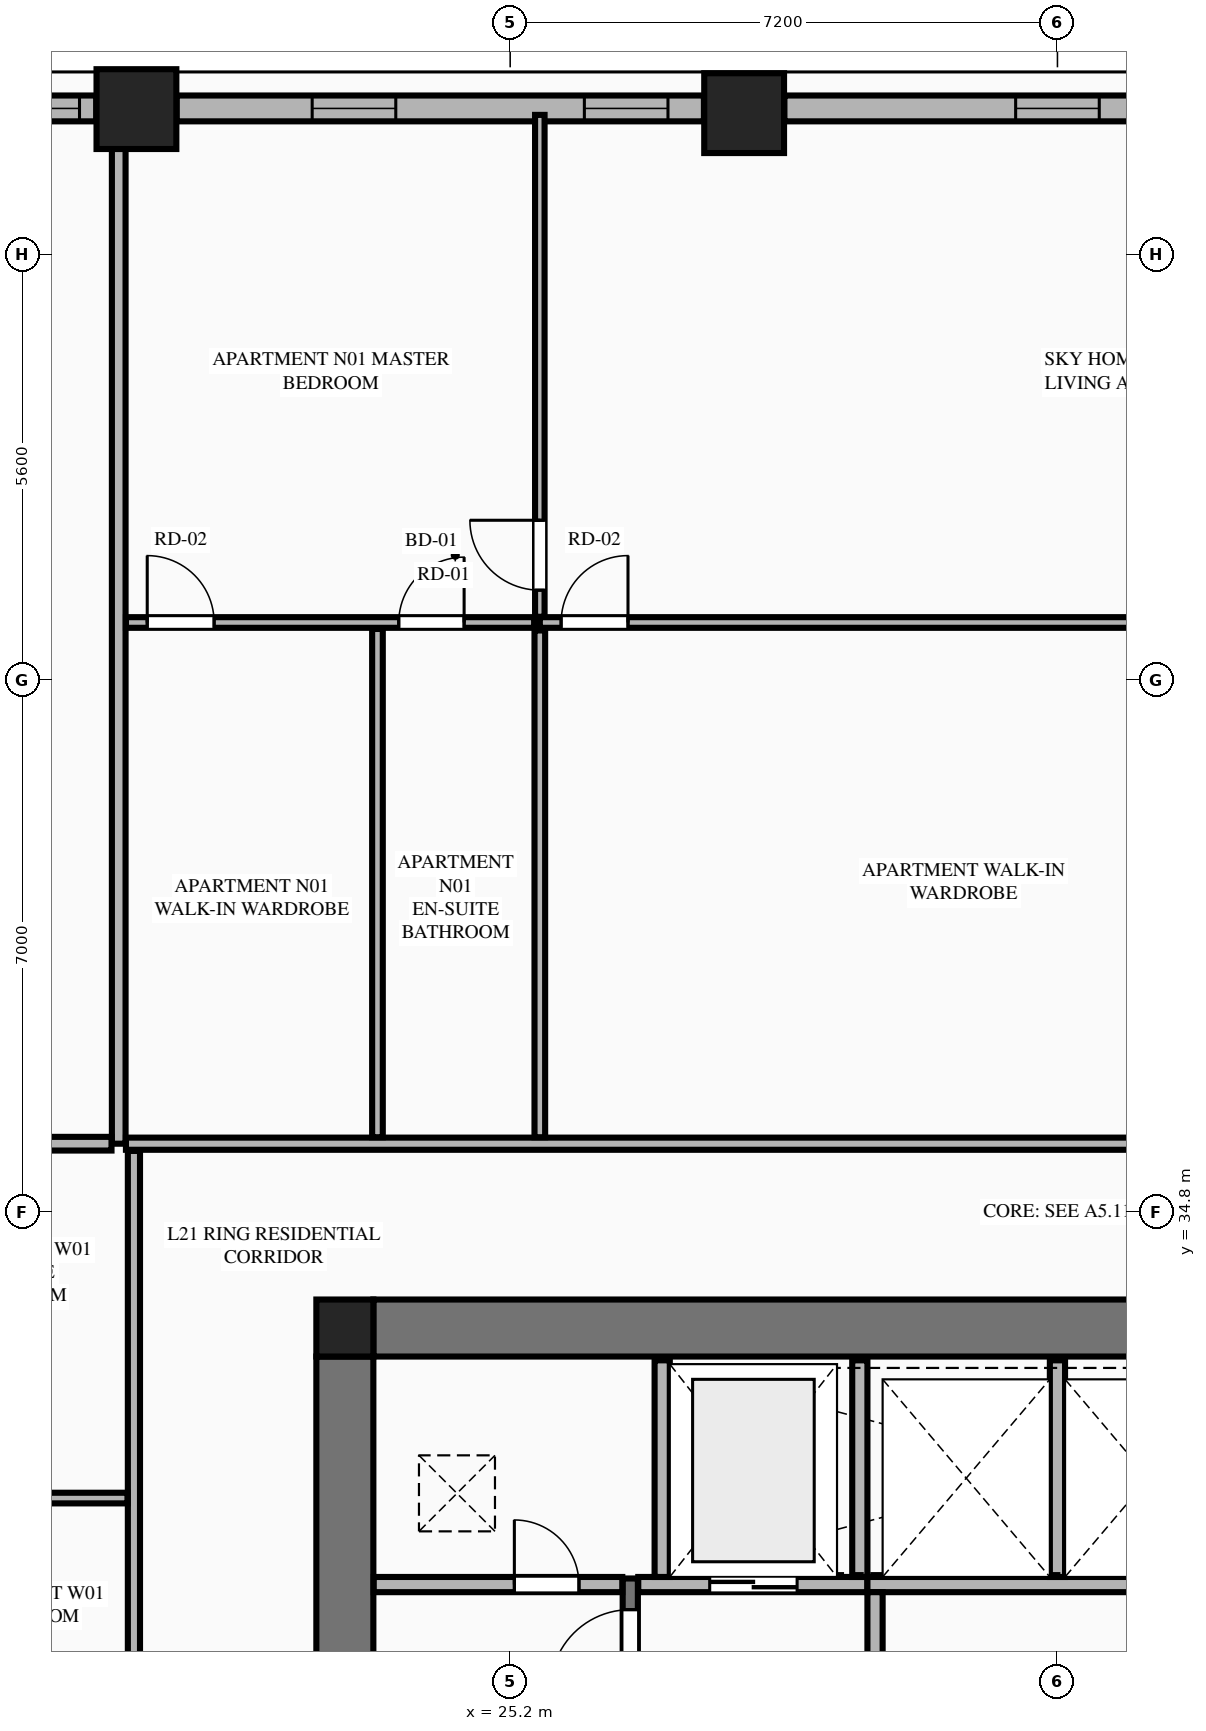
"""IFC4 building model, lengths in metres.
Left out: names, types, materials, properties, quantities, classifications, styles, units other than length and angle.
Written with IfcOpenShell. Run it as: python <this file> out.ifc"""

import sys

from ifc_helpers import new_model, si_unit, direction, frame, frame_2d, origin, origin_2d, place, context, subcontext, project, spatial, rectangle, extrude, element, fill, save


model = new_model("IFC4")
c1 = context("Model", 3, precision=1e-05, world=origin(), true_north=direction((0.0, 1.0)))
c2 = subcontext(c1, "Body", "Model", "MODEL_VIEW")
j1 = project(units=[si_unit("LENGTHUNIT", "METRE"), si_unit("PLANEANGLEUNIT", "RADIAN")], contexts=[c1])
p1 = place(None, origin())
s1 = spatial("IfcSite", under=j1, at=p1, CompositionType="ELEMENT")
p2 = place(p1, origin())
s2 = spatial("IfcBuilding", under=s1, at=p2, CompositionType="ELEMENT")
p3 = place(p2, frame((0.0, 0.0, 83.55)))
s3 = spatial("IfcBuildingStorey", under=s2, at=p3, CompositionType="ELEMENT", Elevation=83.55)
p4 = place(p3, frame((23.025, 33.275, 0.0), z_axis=(0.0, 0.0, 1.0), x_axis=(1.0, 0.0, 0.0)))
e1 = element("IfcColumn", 1, at=p4, inside=s3, PredefinedType="COLUMN", context=c2, shape_type="SweptSolid", body=[
    extrude(rectangle(XDim=0.75, YDim=0.75, at=origin_2d()), origin(), (0.0, 0.0, 1.0), 3.55),
])
p5 = place(p3, frame((23.4, 33.275, 0.0), z_axis=(0.0, 0.0, 1.0), x_axis=(1.0, 0.0, 0.0)))
e2 = element("IfcWall", 2, at=p5, inside=s3, PredefinedType="SHEAR", context=c2, shape_type="SweptSolid", body=[
    extrude(rectangle(XDim=18.0, YDim=0.75, at=frame_2d((9.0, 0.0))), origin(), (0.0, 0.0, 1.0), 3.33),
])
p6 = place(p3, frame((23.025, 18.9, 0.0), z_axis=(0.0, 0.0, 1.0), x_axis=(0.0, 1.0, 0.0)))
e3 = element("IfcWall", 3, at=p6, inside=s3, PredefinedType="SHEAR", context=c2, shape_type="SweptSolid", body=[
    extrude(rectangle(XDim=14.0, YDim=0.75, at=frame_2d((7.0, 0.0))), origin(), (0.0, 0.0, 1.0), 3.33),
])
p7 = place(p6, frame((2.94, 0.0, 0.0)))
e4 = element("IfcOpeningElement", 4, at=p7, cuts=e3, PredefinedType="OPENING", context=c2, shape_type="SweptSolid", body=[
    extrude(rectangle(XDim=1.22, YDim=2.25, at=frame_2d((0.61, 1.125))), frame((0.0, 0.385, 0.0), z_axis=(0.0, -1.0, 0.0), x_axis=(1.0, 0.0, 0.0)), (0.0, 0.0, 1.0), 0.77),
])
for number, where, z_axis, x_axis in (
    (5, (28.278, 49.258, 0.0), (0.0, 0.0, 1.0), (1.0, 0.0, 0.0)),
    (6, (20.283, 49.311, 0.0), (0.0, 0.0, 1.0), (1.0, 0.0, 0.0)),
):
    element("IfcColumn", number, at=place(p3, frame(where, z_axis=z_axis, x_axis=x_axis)), inside=s3, PredefinedType="COLUMN", context=c2, shape_type="SweptSolid", body=[
        extrude(rectangle(XDim=1.05, YDim=1.05, at=origin_2d()), origin(), (0.0, 0.0, 1.0), 3.55),
    ])
p8 = place(p3, frame((26.78, 23.2, 0.0), z_axis=(0.0, 0.0, 1.0), x_axis=(0.0, 1.0, 0.0)))
e7 = element("IfcWall", 7, at=p8, inside=s3, PredefinedType="SHEAR", context=c2, shape_type="SweptSolid", body=[
    extrude(rectangle(XDim=6.78, YDim=0.2, at=frame_2d((3.39, 0.0))), origin(), (0.0, 0.0, 1.0), 3.55),
])
p9 = place(p8, frame((5.32, 0.0, 0.0)))
e8 = element("IfcOpeningElement", 8, at=p9, cuts=e7, PredefinedType="OPENING", context=c2, shape_type="SweptSolid", body=[
    extrude(rectangle(XDim=1.05, YDim=2.15, at=frame_2d((0.525, 1.075))), frame((0.0, 0.11, 0.0), z_axis=(0.0, -1.0, 0.0), x_axis=(1.0, 0.0, 0.0)), (0.0, 0.0, 1.0), 0.22),
])
p10 = place(p3, frame((23.405, 29.9, 0.0), z_axis=(0.0, 0.0, 1.0), x_axis=(1.0, 0.0, 0.0)))
e9 = element("IfcWall", 9, at=p10, inside=s3, PredefinedType="PLUMBINGWALL", context=c2, shape_type="SweptSolid", body=[
    extrude(rectangle(XDim=3.27, YDim=0.2, at=frame_2d((1.635, 0.0))), origin(), (0.0, 0.0, 1.0), 3.33),
])
p11 = place(p10, frame((1.85, 0.0, 0.0)))
e10 = element("IfcOpeningElement", 10, at=p11, cuts=e9, PredefinedType="OPENING", context=c2, shape_type="SweptSolid", body=[
    extrude(rectangle(XDim=0.85, YDim=2.05, at=frame_2d((0.425, 1.025))), frame((0.0, 0.11, 0.0), z_axis=(0.0, -1.0, 0.0), x_axis=(1.0, 0.0, 0.0)), (0.0, 0.0, 1.0), 0.22),
])
p12 = place(p3, frame((26.885, 29.9, 0.0), z_axis=(0.0, 0.0, 1.0), x_axis=(1.0, 0.0, 0.0)))
e11 = element("IfcWall", 11, at=p12, inside=s3, PredefinedType="PLUMBINGWALL", context=c2, shape_type="SweptSolid", body=[
    extrude(rectangle(XDim=3.015, YDim=0.2, at=frame_2d((1.507, 0.0))), origin(), (0.0, 0.0, 1.0), 3.33),
])
p13 = place(p12, frame((0.94, 0.0, 0.0)))
e12 = element("IfcOpeningElement", 12, at=p13, cuts=e11, PredefinedType="OPENING", context=c2, shape_type="SweptSolid", body=[
    extrude(rectangle(XDim=1.15, YDim=2.2, at=frame_2d((0.575, 1.1))), frame((0.0, 0.11, 0.0), z_axis=(0.0, -1.0, 0.0), x_axis=(1.0, 0.0, 0.0)), (0.0, 0.0, 1.0), 0.22),
])
p14 = place(p3, frame((29.9, 29.9, 0.0), z_axis=(0.0, 0.0, 1.0), x_axis=(1.0, 0.0, 0.0)))
e13 = element("IfcWall", 13, at=p14, inside=s3, PredefinedType="PLUMBINGWALL", context=c2, shape_type="SweptSolid", body=[
    extrude(rectangle(XDim=5.0, YDim=0.2, at=frame_2d((2.5, 0.0))), origin(), (0.0, 0.0, 1.0), 3.33),
])
for number, where, z_axis, x_axis in (
    (14, (27.2, 30.0, 0.0), (0.0, 0.0, 1.0), (0.0, 1.0, 0.0)),
    (15, (29.8, 30.0, 0.0), (0.0, 0.0, 1.0), (0.0, 1.0, 0.0)),
    (16, (32.4, 30.0, 0.0), (0.0, 0.0, 1.0), (0.0, 1.0, 0.0)),
):
    element("IfcWall", number, at=place(p3, frame(where, z_axis=z_axis, x_axis=x_axis)), inside=s3, PredefinedType="PLUMBINGWALL", context=c2, shape_type="SweptSolid", body=[
        extrude(rectangle(XDim=2.85, YDim=0.2, at=frame_2d((1.425, 0.0))), origin(), (0.0, 0.0, 1.0), 3.33),
    ])
p15 = place(p3, frame((30.0, 27.05, 0.0), z_axis=(0.0, 0.0, 1.0), x_axis=(0.0, 1.0, 0.0)))
e17 = element("IfcWall", 17, at=p15, inside=s3, PredefinedType="PLUMBINGWALL", context=c2, shape_type="SweptSolid", body=[
    extrude(rectangle(XDim=2.75, YDim=0.2, at=frame_2d((1.375, 0.0))), origin(), (0.0, 0.0, 1.0), 3.33),
])
p16 = place(p15, frame((0.85, 0.0, 0.0)))
e18 = element("IfcOpeningElement", 18, at=p16, cuts=e17, PredefinedType="OPENING", context=c2, shape_type="SweptSolid", body=[
    extrude(rectangle(XDim=1.0, YDim=2.15, at=frame_2d((0.5, 1.075))), frame((0.0, 0.11, 0.0), z_axis=(0.0, -1.0, 0.0), x_axis=(1.0, 0.0, 0.0)), (0.0, 0.0, 1.0), 0.22),
])
p17 = place(p3, frame((35.993, 49.32, 0.0), z_axis=(0.0, 0.0, 1.0), x_axis=(-1.0, 0.0, 0.0)))
e19 = element("IfcWall", 19, at=p17, inside=s3, PredefinedType="STANDARD", context=c2, shape_type="SweptSolid", body=[
    extrude(rectangle(XDim=7.186, YDim=0.34, at=frame_2d((3.593, 0.0))), origin(), (0.0, 0.0, 1.0), 2.787),
])
p18 = place(p17, frame((3.043, 0.0, 0.75)))
e20 = element("IfcOpeningElement", 20, at=p18, cuts=e19, PredefinedType="OPENING", context=c2, shape_type="SweptSolid", body=[
    extrude(rectangle(XDim=1.1, YDim=1.887, at=frame_2d((0.55, 0.943))), frame((0.0, 0.18, 0.0), z_axis=(0.0, -1.0, 0.0), x_axis=(1.0, 0.0, 0.0)), (0.0, 0.0, 1.0), 0.36),
])
p19 = place(p3, frame((27.749, 49.32, 0.0), z_axis=(0.0, 0.0, 1.0), x_axis=(-1.0, 0.0, 0.0)))
e21 = element("IfcWall", 21, at=p19, inside=s3, PredefinedType="STANDARD", context=c2, shape_type="SweptSolid", body=[
    extrude(rectangle(XDim=6.937, YDim=0.34, at=frame_2d((3.469, 0.0))), origin(), (0.0, 0.0, 1.0), 2.787),
])
p20 = place(p19, frame((0.473, 0.0, 0.75)))
e22 = element("IfcOpeningElement", 22, at=p20, cuts=e21, PredefinedType="OPENING", context=c2, shape_type="SweptSolid", body=[
    extrude(rectangle(XDim=1.1, YDim=1.887, at=frame_2d((0.55, 0.943))), frame((0.0, 0.18, 0.0), z_axis=(0.0, -1.0, 0.0), x_axis=(1.0, 0.0, 0.0)), (0.0, 0.0, 1.0), 0.36),
])
p21 = place(p19, frame((4.054, 0.0, 0.75)))
e23 = element("IfcOpeningElement", 23, at=p21, cuts=e21, PredefinedType="OPENING", context=c2, shape_type="SweptSolid", body=[
    extrude(rectangle(XDim=1.1, YDim=1.887, at=frame_2d((0.55, 0.943))), frame((0.0, 0.18, 0.0), z_axis=(0.0, -1.0, 0.0), x_axis=(1.0, 0.0, 0.0)), (0.0, 0.0, 1.0), 0.36),
])
p22 = place(p3, frame((19.754, 49.32, 0.0), z_axis=(0.0, 0.0, 1.0), x_axis=(-1.0, 0.0, 0.0)))
e24 = element("IfcWall", 24, at=p22, inside=s3, PredefinedType="STANDARD", context=c2, shape_type="SweptSolid", body=[
    extrude(rectangle(XDim=1.32, YDim=0.34, at=frame_2d((0.66, 0.0))), origin(), (0.0, 0.0, 1.0), 3.33),
])
p23 = place(p22, frame((0.22, 0.0, 0.75)))
e25 = element("IfcOpeningElement", 25, at=p23, cuts=e24, PredefinedType="OPENING", context=c2, shape_type="SweptSolid", body=[
    extrude(rectangle(XDim=0.88, YDim=2.0, at=frame_2d((0.44, 1.0))), frame((0.0, 0.18, 0.0), z_axis=(0.0, -1.0, 0.0), x_axis=(1.0, 0.0, 0.0)), (0.0, 0.0, 1.0), 0.36),
])
p24 = place(p3, frame((20.05, 35.7, 0.0), z_axis=(0.0, 0.0, 1.0), x_axis=(0.0, 1.0, 0.0)))
e26 = element("IfcWall", 26, at=p24, inside=s3, PredefinedType="PARTITIONING", context=c2, shape_type="SweptSolid", body=[
    extrude(rectangle(XDim=13.445, YDim=0.18, at=frame_2d((6.723, 0.0))), origin(), (0.0, 0.0, 1.0), 3.33),
])
p25 = place(p3, frame((20.145, 35.7, 0.0), z_axis=(0.0, 0.0, 1.0), x_axis=(1.0, 0.0, 0.0)))
e27 = element("IfcWall", 27, at=p25, inside=s3, PredefinedType="PARTITIONING", context=c2, shape_type="SweptSolid", body=[
    extrude(rectangle(XDim=24.51, YDim=0.16, at=frame_2d((12.255, 0.0))), origin(), (0.0, 0.0, 1.0), 3.33),
])
p26 = place(p25, frame((22.305, 0.0, 0.0)))
e28 = element("IfcOpeningElement", 28, at=p26, cuts=e27, PredefinedType="OPENING", context=c2, shape_type="SweptSolid", body=[
    extrude(rectangle(XDim=1.02, YDim=2.25, at=frame_2d((0.51, 1.125))), frame((0.0, 0.09, 0.0), z_axis=(0.0, -1.0, 0.0), x_axis=(1.0, 0.0, 0.0)), (0.0, 0.0, 1.0), 0.18),
])
p27 = place(p3, frame((25.59, 42.557, 0.0), z_axis=(0.0, 0.0, 1.0), x_axis=(1.0, 0.0, 0.0)))
e29 = element("IfcWall", 29, at=p27, inside=s3, PredefinedType="PLUMBINGWALL", context=c2, shape_type="SweptSolid", body=[
    extrude(rectangle(XDim=16.61, YDim=0.14, at=frame_2d((8.305, 0.0))), origin(), (0.0, 0.0, 1.0), 3.33),
])
p28 = place(p27, frame((0.28, 0.0, 0.0)))
e30 = element("IfcOpeningElement", 30, at=p28, cuts=e29, PredefinedType="OPENING", context=c2, shape_type="SweptSolid", body=[
    extrude(rectangle(XDim=0.88, YDim=2.15, at=frame_2d((0.44, 1.075))), frame((0.0, 0.08, 0.0), z_axis=(0.0, -1.0, 0.0), x_axis=(1.0, 0.0, 0.0)), (0.0, 0.0, 1.0), 0.16),
])
p29 = place(p27, frame((11.429, 0.0, 0.0)))
e31 = element("IfcOpeningElement", 31, at=p29, cuts=e29, PredefinedType="OPENING", context=c2, shape_type="SweptSolid", body=[
    extrude(rectangle(XDim=0.86, YDim=2.1, at=frame_2d((0.43, 1.05))), frame((0.0, 0.08, 0.0), z_axis=(0.0, -1.0, 0.0), x_axis=(1.0, 0.0, 0.0)), (0.0, 0.0, 1.0), 0.16),
])
p30 = place(p27, frame((13.41, 0.0, 0.0)))
e32 = element("IfcOpeningElement", 32, at=p30, cuts=e29, PredefinedType="OPENING", context=c2, shape_type="SweptSolid", body=[
    extrude(rectangle(XDim=0.88, YDim=2.15, at=frame_2d((0.44, 1.075))), frame((0.0, 0.08, 0.0), z_axis=(0.0, -1.0, 0.0), x_axis=(1.0, 0.0, 0.0)), (0.0, 0.0, 1.0), 0.16),
])
p31 = place(p3, frame((20.145, 42.557, 0.0), z_axis=(0.0, 0.0, 1.0), x_axis=(1.0, 0.0, 0.0)))
e33 = element("IfcWall", 33, at=p31, inside=s3, PredefinedType="PLUMBINGWALL", context=c2, shape_type="SweptSolid", body=[
    extrude(rectangle(XDim=5.37, YDim=0.14, at=frame_2d((2.685, 0.0))), origin(), (0.0, 0.0, 1.0), 3.33),
])
p32 = place(p31, frame((0.28, 0.0, 0.0)))
e34 = element("IfcOpeningElement", 34, at=p32, cuts=e33, PredefinedType="OPENING", context=c2, shape_type="SweptSolid", body=[
    extrude(rectangle(XDim=0.88, YDim=2.15, at=frame_2d((0.44, 1.075))), frame((0.0, 0.08, 0.0), z_axis=(0.0, -1.0, 0.0), x_axis=(1.0, 0.0, 0.0)), (0.0, 0.0, 1.0), 0.16),
])
p33 = place(p31, frame((3.589, 0.0, 0.0)))
e35 = element("IfcOpeningElement", 35, at=p33, cuts=e33, PredefinedType="OPENING", context=c2, shape_type="SweptSolid", body=[
    extrude(rectangle(XDim=0.86, YDim=2.1, at=frame_2d((0.43, 1.05))), frame((0.0, 0.08, 0.0), z_axis=(0.0, -1.0, 0.0), x_axis=(1.0, 0.0, 0.0)), (0.0, 0.0, 1.0), 0.16),
])
p34 = place(p3, frame((25.59, 35.785, 0.0), z_axis=(0.0, 0.0, 1.0), x_axis=(0.0, 1.0, 0.0)))
e36 = element("IfcWall", 36, at=p34, inside=s3, PredefinedType="PLUMBINGWALL", context=c2, shape_type="SweptSolid", body=[
    extrude(rectangle(XDim=6.667, YDim=0.14, at=frame_2d((3.333, 0.0))), origin(), (0.0, 0.0, 1.0), 3.33),
])
p35 = place(p3, frame((25.59, 42.632, 0.0), z_axis=(0.0, 0.0, 1.0), x_axis=(0.0, 1.0, 0.0)))
e37 = element("IfcWall", 37, at=p35, inside=s3, PredefinedType="PARTITIONING", context=c2, shape_type="SweptSolid", body=[
    extrude(rectangle(XDim=6.603, YDim=0.125, at=frame_2d((3.302, 0.0))), origin(), (0.0, 0.0, 1.0), 3.33),
])
p36 = place(p35, frame((0.35, 0.0, 0.0)))
e38 = element("IfcOpeningElement", 38, at=p36, cuts=e37, PredefinedType="OPENING", context=c2, shape_type="SweptSolid", body=[
    extrude(rectangle(XDim=0.92, YDim=2.15, at=frame_2d((0.46, 1.075))), frame((0.0, 0.073, 0.0), z_axis=(0.0, -1.0, 0.0), x_axis=(1.0, 0.0, 0.0)), (0.0, 0.0, 1.0), 0.145),
])
p37 = place(p3, frame((23.454, 35.785, 0.0), z_axis=(0.0, 0.0, 1.0), x_axis=(0.0, 1.0, 0.0)))
e39 = element("IfcWall", 39, at=p37, inside=s3, PredefinedType="PLUMBINGWALL", context=c2, shape_type="SweptSolid", body=[
    extrude(rectangle(XDim=6.687, YDim=0.14, at=frame_2d((3.344, 0.0))), origin(), (0.0, 0.0, 1.0), 3.33),
])
p38 = place(p3, frame((10.589, 35.7, 0.0), z_axis=(0.0, 0.0, 1.0), x_axis=(1.0, 0.0, 0.0)))
e40 = element("IfcWall", 40, at=p38, inside=s3, PredefinedType="PARTITIONING", context=c2, shape_type="SweptSolid", body=[
    extrude(rectangle(XDim=9.366, YDim=0.18, at=frame_2d((4.683, 0.0))), origin(), (0.0, 0.0, 1.0), 3.33),
])
p39 = place(p3, frame((20.25, 16.195, 0.0), z_axis=(0.0, 0.0, 1.0), x_axis=(0.0, 1.0, 0.0)))
e41 = element("IfcWall", 41, at=p39, inside=s3, PredefinedType="PARTITIONING", context=c2, shape_type="SweptSolid", body=[
    extrude(rectangle(XDim=19.41, YDim=0.16, at=frame_2d((9.705, 0.0))), origin(), (0.0, 0.0, 1.0), 2.636),
])
p40 = place(p39, frame((0.45, 0.0, 0.0)))
e42 = element("IfcOpeningElement", 42, at=p40, cuts=e41, PredefinedType="OPENING", context=c2, shape_type="SweptSolid", body=[
    extrude(rectangle(XDim=1.02, YDim=2.25, at=frame_2d((0.51, 1.125))), frame((0.0, 0.09, 0.0), z_axis=(0.0, -1.0, 0.0), x_axis=(1.0, 0.0, 0.0)), (0.0, 0.0, 1.0), 0.18),
])
p41 = place(p3, frame((17.185, 31.038, 0.0), z_axis=(0.0, 0.0, 1.0), x_axis=(1.0, 0.0, 0.0)))
e43 = element("IfcWall", 43, at=p41, inside=s3, PredefinedType="PLUMBINGWALL", context=c2, shape_type="SweptSolid", body=[
    extrude(rectangle(XDim=2.98, YDim=0.14, at=frame_2d((1.49, 0.0))), origin(), (0.0, 0.0, 1.0), 3.33),
])
p42 = place(p9, origin())
e44 = element("IfcDoor", 44, at=p42, inside=s3, OperationType="SINGLE_SWING_LEFT", PredefinedType="DOOR", context=c2, shape_type="SweptSolid", body=[
    extrude(rectangle(XDim=1.05, YDim=2.15, at=frame_2d((0.525, 1.075))), frame((0.0, 0.025, 0.0), z_axis=(0.0, -1.0, 0.0), x_axis=(1.0, 0.0, 0.0)), (0.0, 0.0, 1.0), 0.05),
])
fill(e8, e44)
p43 = place(p11, origin())
e45 = element("IfcDoor", 45, at=p43, inside=s3, OperationType="SINGLE_SWING_LEFT", PredefinedType="DOOR", context=c2, shape_type="SweptSolid", body=[
    extrude(rectangle(XDim=0.85, YDim=2.05, at=frame_2d((0.425, 1.025))), frame((0.0, 0.025, 0.0), z_axis=(0.0, -1.0, 0.0), x_axis=(1.0, 0.0, 0.0)), (0.0, 0.0, 1.0), 0.05),
])
fill(e10, e45)
p44 = place(p13, origin())
e46 = element("IfcDoor", 46, at=p44, inside=s3, OperationType="DOUBLE_DOOR_SLIDING", PredefinedType="DOOR", context=c2, shape_type="SweptSolid", body=[
    extrude(rectangle(XDim=1.15, YDim=2.2, at=frame_2d((0.575, 1.1))), frame((0.0, 0.025, 0.0), z_axis=(0.0, -1.0, 0.0), x_axis=(1.0, 0.0, 0.0)), (0.0, 0.0, 1.0), 0.05),
])
fill(e12, e46)
p45 = place(p18, origin())
e47 = element("IfcWindow", 47, at=p45, inside=s3, PartitioningType="SINGLE_PANEL", PredefinedType="WINDOW", context=c2, shape_type="SweptSolid", body=[
    extrude(rectangle(XDim=1.1, YDim=1.887, at=frame_2d((0.55, 0.943))), frame((0.0, 0.03, 0.0), z_axis=(0.0, -1.0, 0.0), x_axis=(1.0, 0.0, 0.0)), (0.0, 0.0, 1.0), 0.06),
])
fill(e20, e47)
p46 = place(p20, origin())
e48 = element("IfcWindow", 48, at=p46, inside=s3, PartitioningType="SINGLE_PANEL", PredefinedType="WINDOW", context=c2, shape_type="SweptSolid", body=[
    extrude(rectangle(XDim=1.1, YDim=1.887, at=frame_2d((0.55, 0.943))), frame((0.0, 0.03, 0.0), z_axis=(0.0, -1.0, 0.0), x_axis=(1.0, 0.0, 0.0)), (0.0, 0.0, 1.0), 0.06),
])
fill(e22, e48)
p47 = place(p28, origin())
e49 = element("IfcDoor", 49, at=p47, inside=s3, OperationType="SINGLE_SWING_RIGHT", PredefinedType="DOOR", context=c2, shape_type="SweptSolid", body=[
    extrude(rectangle(XDim=0.88, YDim=2.15, at=frame_2d((0.44, 1.075))), frame((0.0, 0.025, 0.0), z_axis=(0.0, -1.0, 0.0), x_axis=(1.0, 0.0, 0.0)), (0.0, 0.0, 1.0), 0.05),
])
fill(e30, e49)
p48 = place(p32, origin())
e50 = element("IfcDoor", 50, at=p48, inside=s3, OperationType="SINGLE_SWING_LEFT", PredefinedType="DOOR", context=c2, shape_type="SweptSolid", body=[
    extrude(rectangle(XDim=0.88, YDim=2.15, at=frame_2d((0.44, 1.075))), frame((0.0, 0.025, 0.0), z_axis=(0.0, -1.0, 0.0), x_axis=(1.0, 0.0, 0.0)), (0.0, 0.0, 1.0), 0.05),
])
fill(e34, e50)
p49 = place(p33, origin())
e51 = element("IfcDoor", 51, at=p49, inside=s3, OperationType="SINGLE_SWING_RIGHT", PredefinedType="DOOR", context=c2, shape_type="SweptSolid", body=[
    extrude(rectangle(XDim=0.86, YDim=2.1, at=frame_2d((0.43, 1.05))), frame((0.0, 0.025, 0.0), z_axis=(0.0, -1.0, 0.0), x_axis=(1.0, 0.0, 0.0)), (0.0, 0.0, 1.0), 0.05),
])
fill(e35, e51)
p50 = place(p36, origin())
e52 = element("IfcDoor", 52, at=p50, inside=s3, OperationType="SINGLE_SWING_RIGHT", PredefinedType="DOOR", context=c2, shape_type="SweptSolid", body=[
    extrude(rectangle(XDim=0.92, YDim=2.15, at=frame_2d((0.46, 1.075))), frame((0.0, 0.025, 0.0), z_axis=(0.0, -1.0, 0.0), x_axis=(1.0, 0.0, 0.0)), (0.0, 0.0, 1.0), 0.05),
])
fill(e38, e52)
p51 = place(p21, origin())
e53 = element("IfcWindow", 53, at=p51, inside=s3, PartitioningType="SINGLE_PANEL", PredefinedType="WINDOW", context=c2, shape_type="SweptSolid", body=[
    extrude(rectangle(XDim=1.1, YDim=1.887, at=frame_2d((0.55, 0.943))), frame((0.0, 0.03, 0.0), z_axis=(0.0, -1.0, 0.0), x_axis=(1.0, 0.0, 0.0)), (0.0, 0.0, 1.0), 0.06),
])
fill(e23, e53)
p52 = place(p23, origin())
e54 = element("IfcWindow", 54, at=p52, inside=s3, PartitioningType="SINGLE_PANEL", PredefinedType="WINDOW", context=c2, shape_type="SweptSolid", body=[
    extrude(rectangle(XDim=0.88, YDim=2.0, at=frame_2d((0.44, 1.0))), frame((0.0, 0.03, 0.0), z_axis=(0.0, -1.0, 0.0), x_axis=(1.0, 0.0, 0.0)), (0.0, 0.0, 1.0), 0.06),
])
fill(e25, e54)
save(model, sys.argv[1])
